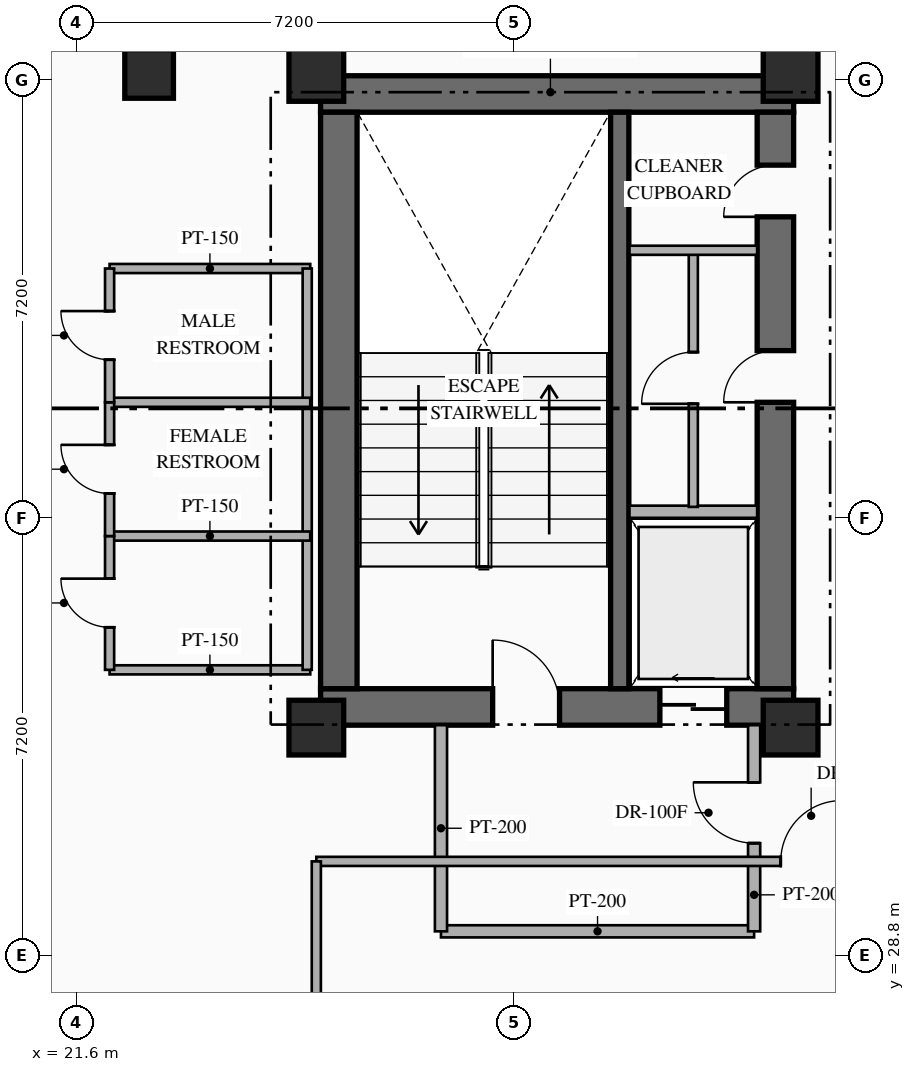
"""IFC4 building model, lengths in metres.
Left out: names, types, materials, properties, quantities, classifications, styles, units other than length and angle.
Written with IfcOpenShell. Run it as: python <this file> out.ifc"""

import sys

from ifc_helpers import new_model, si_unit, direction, frame, frame_2d, origin, origin_2d, place, context, subcontext, project, spatial, rectangle, hollow_rectangle, extrude, element, fill, save


model = new_model("IFC4")
c1 = context("Model", 3, precision=1e-05, world=origin(), true_north=direction((0.0, 1.0)))
c2 = subcontext(c1, "Body", "Model", "MODEL_VIEW")
j1 = project(units=[si_unit("LENGTHUNIT", "METRE"), si_unit("PLANEANGLEUNIT", "RADIAN")], contexts=[c1])
p1 = place(None, origin())
s1 = spatial("IfcSite", under=j1, at=p1, CompositionType="ELEMENT")
p2 = place(p1, origin())
s2 = spatial("IfcBuilding", under=s1, at=p2, CompositionType="ELEMENT")
p3 = place(p2, frame((0.0, 0.0, 152.85)))
s3 = spatial("IfcBuildingStorey", under=s2, at=p3, CompositionType="ELEMENT", Elevation=152.85)
p4 = place(p3, frame((25.62, 32.89, 0.0), z_axis=(0.0, 0.0, 1.0), x_axis=(1.0, 0.0, 0.0)))
e1 = element("IfcWall", 1, at=p4, inside=s3, PredefinedType="SHEAR", context=c2, shape_type="SweptSolid", body=[
    extrude(rectangle(XDim=7.78, YDim=0.6, at=frame_2d((3.89, 0.0))), origin(), (0.0, 0.0, 1.0), 3.6),
])
p5 = place(p4, frame((2.83, 0.0, 0.0)))
e2 = element("IfcOpeningElement", 2, at=p5, cuts=e1, PredefinedType="OPENING", context=c2, shape_type="SweptSolid", body=[
    extrude(rectangle(XDim=1.1, YDim=2.2, at=frame_2d((0.55, 1.1))), frame((0.0, 0.31, 0.0), z_axis=(0.0, -1.0, 0.0), x_axis=(1.0, 0.0, 0.0)), (0.0, 0.0, 1.0), 0.62),
])
p6 = place(p4, frame((5.58, 0.0, 0.0)))
e3 = element("IfcOpeningElement", 3, at=p6, cuts=e1, PredefinedType="OPENING", context=c2, shape_type="SweptSolid", body=[
    extrude(rectangle(XDim=1.1, YDim=2.15, at=frame_2d((0.55, 1.075))), frame((0.0, 0.31, 0.0), z_axis=(0.0, -1.0, 0.0), x_axis=(1.0, 0.0, 0.0)), (0.0, 0.0, 1.0), 0.62),
])
p7 = place(p3, frame((25.62, 42.97, 0.0), z_axis=(0.0, 0.0, 1.0), x_axis=(1.0, 0.0, 0.0)))
e4 = element("IfcWall", 4, at=p7, inside=s3, PredefinedType="SHEAR", context=c2, shape_type="SweptSolid", body=[
    extrude(rectangle(XDim=7.78, YDim=0.6, at=frame_2d((3.89, 0.0))), origin(), (0.0, 0.0, 1.0), 3.6),
])
p8 = place(p3, frame((25.92, 33.19, 0.0), z_axis=(0.0, 0.0, 1.0), x_axis=(0.0, 1.0, 0.0)))
e5 = element("IfcWall", 5, at=p8, inside=s3, PredefinedType="SHEAR", context=c2, shape_type="SweptSolid", body=[
    extrude(rectangle(XDim=9.48, YDim=0.6, at=frame_2d((4.74, 0.0))), origin(), (0.0, 0.0, 1.0), 3.6),
])
p9 = place(p3, frame((33.1, 33.19, 0.0), z_axis=(0.0, 0.0, 1.0), x_axis=(0.0, 1.0, 0.0)))
e6 = element("IfcWall", 6, at=p9, inside=s3, PredefinedType="SHEAR", context=c2, shape_type="SweptSolid", body=[
    extrude(rectangle(XDim=9.48, YDim=0.6, at=frame_2d((4.74, 0.0))), origin(), (0.0, 0.0, 1.0), 3.6),
])
p10 = place(p9, frame((4.71, 0.0, 0.0)))
e7 = element("IfcOpeningElement", 7, at=p10, cuts=e6, PredefinedType="OPENING", context=c2, shape_type="SweptSolid", body=[
    extrude(rectangle(XDim=0.85, YDim=2.08, at=frame_2d((0.425, 1.04))), frame((0.0, 0.31, 0.0), z_axis=(0.0, -1.0, 0.0), x_axis=(1.0, 0.0, 0.0)), (0.0, 0.0, 1.0), 0.62),
])
p11 = place(p9, frame((7.76, 0.0, 0.0)))
e8 = element("IfcOpeningElement", 8, at=p11, cuts=e6, PredefinedType="OPENING", context=c2, shape_type="SweptSolid", body=[
    extrude(rectangle(XDim=0.85, YDim=2.08, at=frame_2d((0.425, 1.04))), frame((0.0, 0.31, 0.0), z_axis=(0.0, -1.0, 0.0), x_axis=(1.0, 0.0, 0.0)), (0.0, 0.0, 1.0), 0.62),
])
p12 = place(p3, frame((30.54, 33.19, 0.0), z_axis=(0.0, 0.0, 1.0), x_axis=(0.0, 1.0, 0.0)))
e9 = element("IfcWall", 9, at=p12, inside=s3, PredefinedType="SHEAR", context=c2, shape_type="SweptSolid", body=[
    extrude(rectangle(XDim=9.48, YDim=0.3, at=frame_2d((4.74, 0.0))), origin(), (0.0, 0.0, 1.0), 3.6),
])
for number, where, z_axis, x_axis in (
    (10, (25.55, 32.55, 0.0), (0.0, 0.0, 1.0), (1.0, 0.0, 0.0)),
    (11, (33.35, 32.55, 0.0), (0.0, 0.0, 1.0), (1.0, 0.0, 0.0)),
    (12, (25.55, 43.3, 0.0), (0.0, 0.0, 1.0), (1.0, 0.0, 0.0)),
    (13, (33.35, 43.3, 0.0), (0.0, 0.0, 1.0), (1.0, 0.0, 0.0)),
):
    element("IfcColumn", number, at=place(p3, frame(where, z_axis=z_axis, x_axis=x_axis)), inside=s3, PredefinedType="COLUMN", context=c2, shape_type="SweptSolid", body=[
        extrude(rectangle(XDim=0.9, YDim=0.9, at=origin_2d()), origin(), (0.0, 0.0, 1.0), 3.6),
    ])
p13 = place(p3, frame((22.8, 43.3, 0.0), z_axis=(0.0, 0.0, 1.0), x_axis=(1.0, 0.0, 0.0)))
e14 = element("IfcColumn", 14, at=p13, inside=s3, PredefinedType="COLUMN", context=c2, shape_type="SweptSolid", body=[
    extrude(hollow_rectangle(XDim=0.8, YDim=0.8, WallThickness=0.032, at=origin_2d()), origin(), (0.0, 0.0, 1.0), 3.6),
])
p14 = place(p3, frame((30.7, 36.1, 0.0), z_axis=(0.0, 0.0, 1.0), x_axis=(1.0, 0.0, 0.0)))
e15 = element("IfcWall", 15, at=p14, inside=s3, PredefinedType="STANDARD", context=c2, shape_type="SweptSolid", body=[
    extrude(rectangle(XDim=2.1, YDim=0.2, at=frame_2d((1.05, 0.0))), origin(), (0.0, 0.0, 1.0), 3.35),
])
p15 = place(p3, frame((31.75, 36.18, 0.0), z_axis=(0.0, 0.0, 1.0), x_axis=(0.0, 1.0, 0.0)))
e16 = element("IfcWall", 16, at=p15, inside=s3, PredefinedType="PARTITIONING", context=c2, shape_type="SweptSolid", body=[
    extrude(rectangle(XDim=4.24, YDim=0.15, at=frame_2d((2.12, 0.0))), origin(), (0.0, 0.0, 1.0), 3.35),
])
p16 = place(p15, frame((1.695, 0.0, 0.0)))
e17 = element("IfcOpeningElement", 17, at=p16, cuts=e16, PredefinedType="OPENING", context=c2, shape_type="SweptSolid", body=[
    extrude(rectangle(XDim=0.85, YDim=2.08, at=frame_2d((0.425, 1.04))), frame((0.0, 0.085, 0.0), z_axis=(0.0, -1.0, 0.0), x_axis=(1.0, 0.0, 0.0)), (0.0, 0.0, 1.0), 0.17),
])
p17 = place(p3, frame((30.7, 40.4, 0.0), z_axis=(0.0, 0.0, 1.0), x_axis=(1.0, 0.0, 0.0)))
e18 = element("IfcWall", 18, at=p17, inside=s3, PredefinedType="PARTITIONING", context=c2, shape_type="SweptSolid", body=[
    extrude(rectangle(XDim=2.1, YDim=0.15, at=frame_2d((1.05, 0.0))), origin(), (0.0, 0.0, 1.0), 3.35),
])
p18 = place(p3, frame((27.6, 29.2, 0.0), z_axis=(0.0, 0.0, 1.0), x_axis=(1.0, 0.0, 0.0)))
e19 = element("IfcWall", 19, at=p18, inside=s3, PredefinedType="STANDARD", context=c2, shape_type="SweptSolid", body=[
    extrude(rectangle(XDim=5.15, YDim=0.2, at=frame_2d((2.575, 0.0))), origin(), (0.0, 0.0, 1.0), 3.35),
])
p19 = place(p3, frame((27.6, 29.2, 0.0), z_axis=(0.0, 0.0, 1.0), x_axis=(0.0, 1.0, 0.0)))
e20 = element("IfcWall", 20, at=p19, inside=s3, PredefinedType="STANDARD", context=c2, shape_type="SweptSolid", body=[
    extrude(rectangle(XDim=3.39, YDim=0.2, at=frame_2d((1.695, 0.0))), origin(), (0.0, 0.0, 1.0), 3.35),
])
p20 = place(p3, frame((32.75, 29.2, 0.0), z_axis=(0.0, 0.0, 1.0), x_axis=(0.0, 1.0, 0.0)))
e21 = element("IfcWall", 21, at=p20, inside=s3, PredefinedType="STANDARD", context=c2, shape_type="SweptSolid", body=[
    extrude(rectangle(XDim=3.39, YDim=0.2, at=frame_2d((1.695, 0.0))), origin(), (0.0, 0.0, 1.0), 3.35),
])
p21 = place(p20, frame((1.45, 0.0, 0.0)))
e22 = element("IfcOpeningElement", 22, at=p21, cuts=e21, PredefinedType="OPENING", context=c2, shape_type="SweptSolid", body=[
    extrude(rectangle(XDim=1.0, YDim=2.2, at=frame_2d((0.5, 1.1))), frame((0.0, 0.11, 0.0), z_axis=(0.0, -1.0, 0.0), x_axis=(1.0, 0.0, 0.0)), (0.0, 0.0, 1.0), 0.22),
])
for number, where, z_axis, x_axis in (
    (23, (22.15, 33.5, 0.0), (0.0, 0.0, 1.0), (1.0, 0.0, 0.0)),
    (24, (22.15, 40.1, 0.0), (0.0, 0.0, 1.0), (1.0, 0.0, 0.0)),
):
    element("IfcWall", number, at=place(p3, frame(where, z_axis=z_axis, x_axis=x_axis)), inside=s3, PredefinedType="PARTITIONING", context=c2, shape_type="SweptSolid", body=[
        extrude(rectangle(XDim=3.3, YDim=0.15, at=frame_2d((1.65, 0.0))), origin(), (0.0, 0.0, 1.0), 3.35),
    ])
p22 = place(p3, frame((25.4, 33.5, 0.0), z_axis=(0.0, 0.0, 1.0), x_axis=(0.0, 1.0, 0.0)))
e25 = element("IfcWall", 25, at=p22, inside=s3, PredefinedType="PARTITIONING", context=c2, shape_type="SweptSolid", body=[
    extrude(rectangle(XDim=6.6, YDim=0.15, at=frame_2d((3.3, 0.0))), origin(), (0.0, 0.0, 1.0), 3.35),
])
for number, where, z_axis, x_axis in (
    (26, (22.15, 35.7, 0.0), (0.0, 0.0, 1.0), (1.0, 0.0, 0.0)),
    (27, (22.15, 37.9, 0.0), (0.0, 0.0, 1.0), (1.0, 0.0, 0.0)),
):
    element("IfcWall", number, at=place(p3, frame(where, z_axis=z_axis, x_axis=x_axis)), inside=s3, PredefinedType="PARTITIONING", context=c2, shape_type="SweptSolid", body=[
        extrude(rectangle(XDim=3.3, YDim=0.15, at=frame_2d((1.65, 0.0))), origin(), (0.0, 0.0, 1.0), 3.35),
    ])
p23 = place(p3, frame((22.15, 33.5, 0.0), z_axis=(0.0, 0.0, 1.0), x_axis=(0.0, 1.0, 0.0)))
e28 = element("IfcWall", 28, at=p23, inside=s3, PredefinedType="PARTITIONING", context=c2, shape_type="SweptSolid", body=[
    extrude(rectangle(XDim=2.2, YDim=0.15, at=frame_2d((1.1, 0.0))), origin(), (0.0, 0.0, 1.0), 3.35),
])
p24 = place(p23, frame((0.7, 0.0, 0.0)))
e29 = element("IfcOpeningElement", 29, at=p24, cuts=e28, PredefinedType="OPENING", context=c2, shape_type="SweptSolid", body=[
    extrude(rectangle(XDim=0.8, YDim=2.06, at=frame_2d((0.4, 1.03))), frame((0.0, 0.085, 0.0), z_axis=(0.0, -1.0, 0.0), x_axis=(1.0, 0.0, 0.0)), (0.0, 0.0, 1.0), 0.17),
])
p25 = place(p3, frame((22.15, 35.7, 0.0), z_axis=(0.0, 0.0, 1.0), x_axis=(0.0, 1.0, 0.0)))
e30 = element("IfcWall", 30, at=p25, inside=s3, PredefinedType="PARTITIONING", context=c2, shape_type="SweptSolid", body=[
    extrude(rectangle(XDim=2.2, YDim=0.15, at=frame_2d((1.1, 0.0))), origin(), (0.0, 0.0, 1.0), 3.35),
])
p26 = place(p25, frame((0.7, 0.0, 0.0)))
e31 = element("IfcOpeningElement", 31, at=p26, cuts=e30, PredefinedType="OPENING", context=c2, shape_type="SweptSolid", body=[
    extrude(rectangle(XDim=0.8, YDim=2.06, at=frame_2d((0.4, 1.03))), frame((0.0, 0.085, 0.0), z_axis=(0.0, -1.0, 0.0), x_axis=(1.0, 0.0, 0.0)), (0.0, 0.0, 1.0), 0.17),
])
p27 = place(p3, frame((22.15, 37.9, 0.0), z_axis=(0.0, 0.0, 1.0), x_axis=(0.0, 1.0, 0.0)))
e32 = element("IfcWall", 32, at=p27, inside=s3, PredefinedType="PARTITIONING", context=c2, shape_type="SweptSolid", body=[
    extrude(rectangle(XDim=2.2, YDim=0.15, at=frame_2d((1.1, 0.0))), origin(), (0.0, 0.0, 1.0), 3.35),
])
p28 = place(p27, frame((0.7, 0.0, 0.0)))
e33 = element("IfcOpeningElement", 33, at=p28, cuts=e32, PredefinedType="OPENING", context=c2, shape_type="SweptSolid", body=[
    extrude(rectangle(XDim=0.8, YDim=2.06, at=frame_2d((0.4, 1.03))), frame((0.0, 0.085, 0.0), z_axis=(0.0, -1.0, 0.0), x_axis=(1.0, 0.0, 0.0)), (0.0, 0.0, 1.0), 0.17),
])
p29 = place(p3, frame((25.55, 30.35, 0.0), z_axis=(0.0, 0.0, 1.0), x_axis=(1.0, 0.0, 0.0)))
e34 = element("IfcWall", 34, at=p29, inside=s3, PredefinedType="PARTITIONING", context=c2, shape_type="SweptSolid", body=[
    extrude(rectangle(XDim=9.4, YDim=0.15, at=frame_2d((4.7, 0.0))), origin(), (0.0, 0.0, 1.0), 3.35),
])
p30 = place(p29, frame((7.638, 0.0, 0.0)))
e35 = element("IfcOpeningElement", 35, at=p30, cuts=e34, PredefinedType="OPENING", context=c2, shape_type="SweptSolid", body=[
    extrude(rectangle(XDim=1.0, YDim=2.15, at=frame_2d((0.5, 1.075))), frame((0.0, 0.085, 0.0), z_axis=(0.0, -1.0, 0.0), x_axis=(1.0, 0.0, 0.0)), (0.0, 0.0, 1.0), 0.17),
])
p31 = place(p3, frame((25.55, 23.2, 0.0), z_axis=(0.0, 0.0, 1.0), x_axis=(0.0, 1.0, 0.0)))
e36 = element("IfcWall", 36, at=p31, inside=s3, PredefinedType="PARTITIONING", context=c2, shape_type="SweptSolid", body=[
    extrude(rectangle(XDim=7.15, YDim=0.15, at=frame_2d((3.575, 0.0))), origin(), (0.0, 0.0, 1.0), 2.695),
])
p32 = place(p5, origin())
e37 = element("IfcDoor", 37, at=p32, inside=s3, OperationType="SINGLE_SWING_LEFT", PredefinedType="DOOR", context=c2, shape_type="SweptSolid", body=[
    extrude(rectangle(XDim=1.1, YDim=2.2, at=frame_2d((0.55, 1.1))), frame((0.0, 0.025, 0.0), z_axis=(0.0, -1.0, 0.0), x_axis=(1.0, 0.0, 0.0)), (0.0, 0.0, 1.0), 0.05),
])
fill(e2, e37)
p33 = place(p6, origin())
e38 = element("IfcDoor", 38, at=p33, inside=s3, OperationType="SLIDING_TO_LEFT", PredefinedType="USERDEFINED", context=c2, shape_type="SweptSolid", body=[
    extrude(rectangle(XDim=1.1, YDim=2.15, at=frame_2d((0.55, 1.075))), frame((0.0, 0.025, 0.0), z_axis=(0.0, -1.0, 0.0), x_axis=(1.0, 0.0, 0.0)), (0.0, 0.0, 1.0), 0.05),
])
fill(e3, e38)
p34 = place(p10, origin())
e39 = element("IfcDoor", 39, at=p34, inside=s3, OperationType="SINGLE_SWING_LEFT", PredefinedType="DOOR", context=c2, shape_type="SweptSolid", body=[
    extrude(rectangle(XDim=0.85, YDim=2.08, at=frame_2d((0.425, 1.04))), frame((0.0, 0.025, 0.0), z_axis=(0.0, -1.0, 0.0), x_axis=(1.0, 0.0, 0.0)), (0.0, 0.0, 1.0), 0.05),
])
fill(e7, e39)
p35 = place(p11, origin())
e40 = element("IfcDoor", 40, at=p35, inside=s3, OperationType="SINGLE_SWING_LEFT", PredefinedType="DOOR", context=c2, shape_type="SweptSolid", body=[
    extrude(rectangle(XDim=0.85, YDim=2.08, at=frame_2d((0.425, 1.04))), frame((0.0, 0.025, 0.0), z_axis=(0.0, -1.0, 0.0), x_axis=(1.0, 0.0, 0.0)), (0.0, 0.0, 1.0), 0.05),
])
fill(e8, e40)
p36 = place(p16, origin())
e41 = element("IfcDoor", 41, at=p36, inside=s3, OperationType="SINGLE_SWING_LEFT", PredefinedType="DOOR", context=c2, shape_type="SweptSolid", body=[
    extrude(rectangle(XDim=0.85, YDim=2.08, at=frame_2d((0.425, 1.04))), frame((0.0, 0.025, 0.0), z_axis=(0.0, -1.0, 0.0), x_axis=(1.0, 0.0, 0.0)), (0.0, 0.0, 1.0), 0.05),
])
fill(e17, e41)
p37 = place(p21, origin())
e42 = element("IfcDoor", 42, at=p37, inside=s3, OperationType="SINGLE_SWING_RIGHT", PredefinedType="DOOR", context=c2, shape_type="SweptSolid", body=[
    extrude(rectangle(XDim=1.0, YDim=2.2, at=frame_2d((0.5, 1.1))), frame((0.0, 0.025, 0.0), z_axis=(0.0, -1.0, 0.0), x_axis=(1.0, 0.0, 0.0)), (0.0, 0.0, 1.0), 0.05),
])
fill(e22, e42)
p38 = place(p24, origin())
e43 = element("IfcDoor", 43, at=p38, inside=s3, OperationType="SINGLE_SWING_RIGHT", PredefinedType="DOOR", context=c2, shape_type="SweptSolid", body=[
    extrude(rectangle(XDim=0.8, YDim=2.06, at=frame_2d((0.4, 1.03))), frame((0.0, 0.025, 0.0), z_axis=(0.0, -1.0, 0.0), x_axis=(1.0, 0.0, 0.0)), (0.0, 0.0, 1.0), 0.05),
])
fill(e29, e43)
p39 = place(p26, origin())
e44 = element("IfcDoor", 44, at=p39, inside=s3, OperationType="SINGLE_SWING_RIGHT", PredefinedType="DOOR", context=c2, shape_type="SweptSolid", body=[
    extrude(rectangle(XDim=0.8, YDim=2.06, at=frame_2d((0.4, 1.03))), frame((0.0, 0.025, 0.0), z_axis=(0.0, -1.0, 0.0), x_axis=(1.0, 0.0, 0.0)), (0.0, 0.0, 1.0), 0.05),
])
fill(e31, e44)
p40 = place(p28, origin())
e45 = element("IfcDoor", 45, at=p40, inside=s3, OperationType="SINGLE_SWING_RIGHT", PredefinedType="DOOR", context=c2, shape_type="SweptSolid", body=[
    extrude(rectangle(XDim=0.8, YDim=2.06, at=frame_2d((0.4, 1.03))), frame((0.0, 0.025, 0.0), z_axis=(0.0, -1.0, 0.0), x_axis=(1.0, 0.0, 0.0)), (0.0, 0.0, 1.0), 0.05),
])
fill(e33, e45)
p41 = place(p30, origin())
e46 = element("IfcDoor", 46, at=p41, inside=s3, OperationType="SINGLE_SWING_RIGHT", PredefinedType="DOOR", context=c2, shape_type="SweptSolid", body=[
    extrude(rectangle(XDim=1.0, YDim=2.15, at=frame_2d((0.5, 1.075))), frame((0.0, 0.025, 0.0), z_axis=(0.0, -1.0, 0.0), x_axis=(1.0, 0.0, 0.0)), (0.0, 0.0, 1.0), 0.05),
])
fill(e35, e46)
save(model, sys.argv[1])
